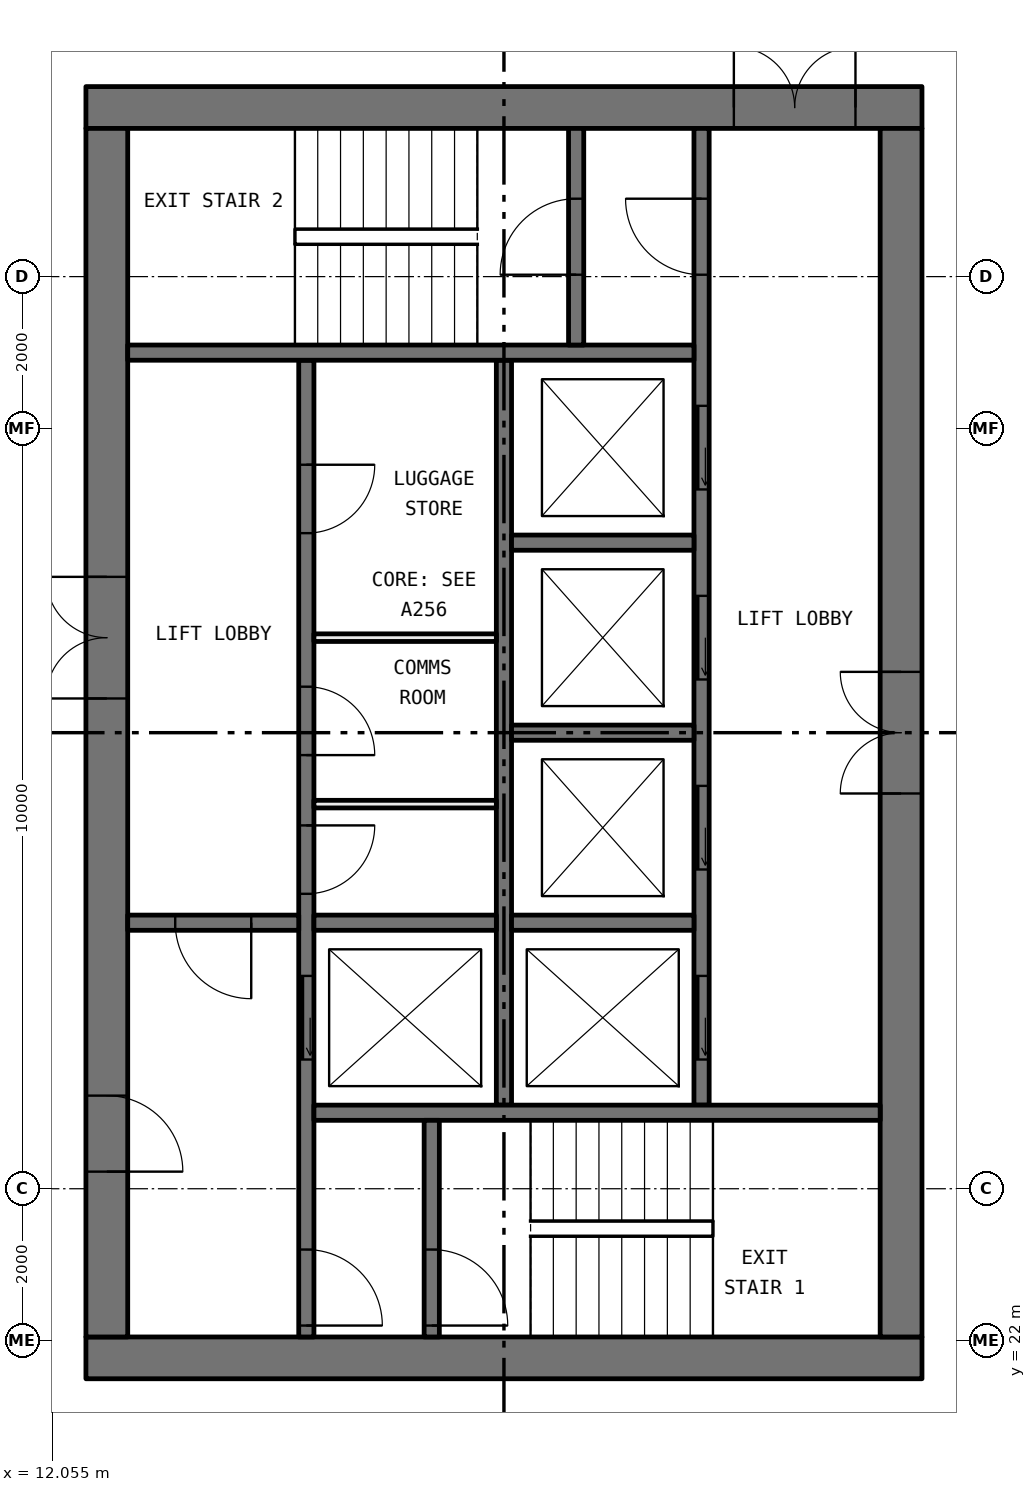
"""IFC4 building model, lengths in metres.
Left out: names, types, materials, properties, quantities, classifications, styles, units other than length and angle.
Written with IfcOpenShell. Run it as: python <this file> out.ifc"""

import sys

from ifc_helpers import new_model, si_unit, direction, frame, frame_2d, origin, place, context, subcontext, project, spatial, rectangle, extrude, element, fill, save


model = new_model("IFC4")
c1 = context("Model", 3, precision=1e-05, world=origin(), true_north=direction((0.0, 1.0)))
c2 = subcontext(c1, "Body", "Model", "MODEL_VIEW")
j1 = project(units=[si_unit("LENGTHUNIT", "METRE"), si_unit("PLANEANGLEUNIT", "RADIAN")], contexts=[c1])
p1 = place(None, origin())
s1 = spatial("IfcSite", under=j1, at=p1, CompositionType="ELEMENT")
p2 = place(p1, origin())
s2 = spatial("IfcBuilding", under=s1, at=p2, CompositionType="ELEMENT")
p3 = place(p2, frame((0.0, 0.0, 206.55)))
s3 = spatial("IfcBuildingStorey", under=s2, at=p3, CompositionType="ELEMENT", Elevation=206.55)
p4 = place(p3, frame((12.5, 21.775, 0.0), z_axis=(0.0, 0.0, 1.0), x_axis=(1.0, 0.0, 0.0)))
e1 = element("IfcWall", 1, at=p4, inside=s3, PredefinedType="SHEAR", context=c2, shape_type="SweptSolid", body=[
    extrude(rectangle(XDim=11.0, YDim=0.55, at=frame_2d((5.5, 0.0))), origin(), (0.0, 0.0, 1.0), 3.05),
])
p5 = place(p3, frame((12.5, 38.225, 0.0), z_axis=(0.0, 0.0, 1.0), x_axis=(1.0, 0.0, 0.0)))
e2 = element("IfcWall", 2, at=p5, inside=s3, PredefinedType="SHEAR", context=c2, shape_type="SweptSolid", body=[
    extrude(rectangle(XDim=11.0, YDim=0.55, at=frame_2d((5.5, 0.0))), origin(), (0.0, 0.0, 1.0), 3.05),
])
p6 = place(p5, frame((8.525, 0.0, 0.0)))
e3 = element("IfcOpeningElement", 3, at=p6, cuts=e2, PredefinedType="OPENING", context=c2, shape_type="SweptSolid", body=[
    extrude(rectangle(XDim=1.6, YDim=2.1, at=frame_2d((0.8, 1.05))), frame((0.0, 0.285, 0.0), z_axis=(0.0, -1.0, 0.0), x_axis=(1.0, 0.0, 0.0)), (0.0, 0.0, 1.0), 0.57),
])
p7 = place(p3, frame((12.775, 22.05, 0.0), z_axis=(0.0, 0.0, 1.0), x_axis=(0.0, 1.0, 0.0)))
e4 = element("IfcWall", 4, at=p7, inside=s3, PredefinedType="SHEAR", context=c2, shape_type="SweptSolid", body=[
    extrude(rectangle(XDim=15.9, YDim=0.55, at=frame_2d((7.95, 0.0))), origin(), (0.0, 0.0, 1.0), 3.05),
])
p8 = place(p7, frame((8.4, 0.0, 0.0)))
e5 = element("IfcOpeningElement", 5, at=p8, cuts=e4, PredefinedType="OPENING", context=c2, shape_type="SweptSolid", body=[
    extrude(rectangle(XDim=1.6, YDim=2.1, at=frame_2d((0.8, 1.05))), frame((0.0, 0.285, 0.0), z_axis=(0.0, -1.0, 0.0), x_axis=(1.0, 0.0, 0.0)), (0.0, 0.0, 1.0), 0.57),
])
p9 = place(p7, frame((2.175, 0.0, 0.0)))
e6 = element("IfcOpeningElement", 6, at=p9, cuts=e4, PredefinedType="OPENING", context=c2, shape_type="SweptSolid", body=[
    extrude(rectangle(XDim=1.0, YDim=2.1, at=frame_2d((0.5, 1.05))), frame((0.0, 0.285, 0.0), z_axis=(0.0, -1.0, 0.0), x_axis=(1.0, 0.0, 0.0)), (0.0, 0.0, 1.0), 0.57),
])
p10 = place(p3, frame((23.225, 22.05, 0.0), z_axis=(0.0, 0.0, 1.0), x_axis=(0.0, 1.0, 0.0)))
e7 = element("IfcWall", 7, at=p10, inside=s3, PredefinedType="SHEAR", context=c2, shape_type="SweptSolid", body=[
    extrude(rectangle(XDim=15.9, YDim=0.55, at=frame_2d((7.95, 0.0))), origin(), (0.0, 0.0, 1.0), 3.05),
])
p11 = place(p10, frame((7.15, 0.0, 0.0)))
e8 = element("IfcOpeningElement", 8, at=p11, cuts=e7, PredefinedType="OPENING", context=c2, shape_type="SweptSolid", body=[
    extrude(rectangle(XDim=1.6, YDim=2.1, at=frame_2d((0.8, 1.05))), frame((0.0, 0.285, 0.0), z_axis=(0.0, -1.0, 0.0), x_axis=(1.0, 0.0, 0.0)), (0.0, 0.0, 1.0), 0.57),
])
p12 = place(p3, frame((15.4, 22.05, 0.0), z_axis=(0.0, 0.0, 1.0), x_axis=(0.0, 1.0, 0.0)))
e9 = element("IfcWall", 9, at=p12, inside=s3, PredefinedType="SOLIDWALL", context=c2, shape_type="SweptSolid", body=[
    extrude(rectangle(XDim=12.85, YDim=0.2, at=frame_2d((6.425, 0.0))), origin(), (0.0, 0.0, 1.0), 3.05),
])
p13 = place(p12, frame((3.65, 0.0, 0.0)))
e10 = element("IfcOpeningElement", 10, at=p13, cuts=e9, PredefinedType="OPENING", context=c2, shape_type="SweptSolid", body=[
    extrude(rectangle(XDim=1.1, YDim=2.1, at=frame_2d((0.55, 1.05))), frame((0.0, 0.11, 0.0), z_axis=(0.0, -1.0, 0.0), x_axis=(1.0, 0.0, 0.0)), (0.0, 0.0, 1.0), 0.22),
])
p14 = place(p12, frame((0.15, 0.0, 0.0)))
e11 = element("IfcOpeningElement", 11, at=p14, cuts=e9, PredefinedType="OPENING", context=c2, shape_type="SweptSolid", body=[
    extrude(rectangle(XDim=1.0, YDim=2.1, at=frame_2d((0.5, 1.05))), frame((0.0, 0.11, 0.0), z_axis=(0.0, -1.0, 0.0), x_axis=(1.0, 0.0, 0.0)), (0.0, 0.0, 1.0), 0.22),
])
p15 = place(p12, frame((5.83, 0.0, 0.0)))
e12 = element("IfcOpeningElement", 12, at=p15, cuts=e9, PredefinedType="OPENING", context=c2, shape_type="SweptSolid", body=[
    extrude(rectangle(XDim=0.9, YDim=2.1, at=frame_2d((0.45, 1.05))), frame((0.0, 0.11, 0.0), z_axis=(0.0, -1.0, 0.0), x_axis=(1.0, 0.0, 0.0)), (0.0, 0.0, 1.0), 0.22),
])
p16 = place(p12, frame((7.655, 0.0, 0.0)))
e13 = element("IfcOpeningElement", 13, at=p16, cuts=e9, PredefinedType="OPENING", context=c2, shape_type="SweptSolid", body=[
    extrude(rectangle(XDim=0.9, YDim=2.1, at=frame_2d((0.45, 1.05))), frame((0.0, 0.11, 0.0), z_axis=(0.0, -1.0, 0.0), x_axis=(1.0, 0.0, 0.0)), (0.0, 0.0, 1.0), 0.22),
])
p17 = place(p12, frame((10.575, 0.0, 0.0)))
e14 = element("IfcOpeningElement", 14, at=p17, cuts=e9, PredefinedType="OPENING", context=c2, shape_type="SweptSolid", body=[
    extrude(rectangle(XDim=0.9, YDim=2.1, at=frame_2d((0.45, 1.05))), frame((0.0, 0.11, 0.0), z_axis=(0.0, -1.0, 0.0), x_axis=(1.0, 0.0, 0.0)), (0.0, 0.0, 1.0), 0.22),
])
p18 = place(p3, frame((20.6, 25.1, 0.0), z_axis=(0.0, 0.0, 1.0), x_axis=(0.0, 1.0, 0.0)))
e15 = element("IfcWall", 15, at=p18, inside=s3, PredefinedType="SOLIDWALL", context=c2, shape_type="SweptSolid", body=[
    extrude(rectangle(XDim=12.85, YDim=0.2, at=frame_2d((6.425, 0.0))), origin(), (0.0, 0.0, 1.0), 3.05),
])
p19 = place(p18, frame((0.6, 0.0, 0.0)))
e16 = element("IfcOpeningElement", 16, at=p19, cuts=e15, PredefinedType="OPENING", context=c2, shape_type="SweptSolid", body=[
    extrude(rectangle(XDim=1.1, YDim=2.1, at=frame_2d((0.55, 1.05))), frame((0.0, 0.11, 0.0), z_axis=(0.0, -1.0, 0.0), x_axis=(1.0, 0.0, 0.0)), (0.0, 0.0, 1.0), 0.22),
])
p20 = place(p18, frame((3.1, 0.0, 0.0)))
e17 = element("IfcOpeningElement", 17, at=p20, cuts=e15, PredefinedType="OPENING", context=c2, shape_type="SweptSolid", body=[
    extrude(rectangle(XDim=1.1, YDim=2.1, at=frame_2d((0.55, 1.05))), frame((0.0, 0.11, 0.0), z_axis=(0.0, -1.0, 0.0), x_axis=(1.0, 0.0, 0.0)), (0.0, 0.0, 1.0), 0.22),
])
p21 = place(p18, frame((5.6, 0.0, 0.0)))
e18 = element("IfcOpeningElement", 18, at=p21, cuts=e15, PredefinedType="OPENING", context=c2, shape_type="SweptSolid", body=[
    extrude(rectangle(XDim=1.1, YDim=2.1, at=frame_2d((0.55, 1.05))), frame((0.0, 0.11, 0.0), z_axis=(0.0, -1.0, 0.0), x_axis=(1.0, 0.0, 0.0)), (0.0, 0.0, 1.0), 0.22),
])
p22 = place(p18, frame((8.1, 0.0, 0.0)))
e19 = element("IfcOpeningElement", 19, at=p22, cuts=e15, PredefinedType="OPENING", context=c2, shape_type="SweptSolid", body=[
    extrude(rectangle(XDim=1.1, YDim=2.1, at=frame_2d((0.55, 1.05))), frame((0.0, 0.11, 0.0), z_axis=(0.0, -1.0, 0.0), x_axis=(1.0, 0.0, 0.0)), (0.0, 0.0, 1.0), 0.22),
])
p23 = place(p18, frame((10.925, 0.0, 0.0)))
e20 = element("IfcOpeningElement", 20, at=p23, cuts=e15, PredefinedType="OPENING", context=c2, shape_type="SweptSolid", body=[
    extrude(rectangle(XDim=1.0, YDim=2.1, at=frame_2d((0.5, 1.05))), frame((0.0, 0.11, 0.0), z_axis=(0.0, -1.0, 0.0), x_axis=(1.0, 0.0, 0.0)), (0.0, 0.0, 1.0), 0.22),
])
p24 = place(p3, frame((18.0, 25.1, 0.0), z_axis=(0.0, 0.0, 1.0), x_axis=(0.0, 1.0, 0.0)))
e21 = element("IfcWall", 21, at=p24, inside=s3, PredefinedType="SOLIDWALL", context=c2, shape_type="SweptSolid", body=[
    extrude(rectangle(XDim=9.8, YDim=0.2, at=frame_2d((4.9, 0.0))), origin(), (0.0, 0.0, 1.0), 3.05),
])
for number, where, z_axis, x_axis in (
    (22, (15.5, 25.0, 0.0), (0.0, 0.0, 1.0), (1.0, 0.0, 0.0)),
    (23, (13.05, 35.0, 0.0), (0.0, 0.0, 1.0), (1.0, 0.0, 0.0)),
):
    element("IfcWall", number, at=place(p3, frame(where, z_axis=z_axis, x_axis=x_axis)), inside=s3, PredefinedType="SOLIDWALL", context=c2, shape_type="SweptSolid", body=[
        extrude(rectangle(XDim=7.45, YDim=0.2, at=frame_2d((3.725, 0.0))), origin(), (0.0, 0.0, 1.0), 3.05),
    ])
p25 = place(p3, frame((13.05, 27.5, 0.0), z_axis=(0.0, 0.0, 1.0), x_axis=(1.0, 0.0, 0.0)))
e24 = element("IfcWall", 24, at=p25, inside=s3, PredefinedType="SOLIDWALL", context=c2, shape_type="SweptSolid", body=[
    extrude(rectangle(XDim=2.25, YDim=0.2, at=frame_2d((1.125, 0.0))), origin(), (0.0, 0.0, 1.0), 3.05),
])
p26 = place(p25, frame((0.625, 0.0, 0.0)))
e25 = element("IfcOpeningElement", 25, at=p26, cuts=e24, PredefinedType="OPENING", context=c2, shape_type="SweptSolid", body=[
    extrude(rectangle(XDim=1.0, YDim=2.1, at=frame_2d((0.5, 1.05))), frame((0.0, 0.11, 0.0), z_axis=(0.0, -1.0, 0.0), x_axis=(1.0, 0.0, 0.0)), (0.0, 0.0, 1.0), 0.22),
])
p27 = place(p3, frame((17.05, 22.05, 0.0), z_axis=(0.0, 0.0, 1.0), x_axis=(0.0, 1.0, 0.0)))
e26 = element("IfcWall", 26, at=p27, inside=s3, PredefinedType="SOLIDWALL", context=c2, shape_type="SweptSolid", body=[
    extrude(rectangle(XDim=2.85, YDim=0.2, at=frame_2d((1.425, 0.0))), origin(), (0.0, 0.0, 1.0), 3.05),
])
p28 = place(p27, frame((0.15, 0.0, 0.0)))
e27 = element("IfcOpeningElement", 27, at=p28, cuts=e26, PredefinedType="OPENING", context=c2, shape_type="SweptSolid", body=[
    extrude(rectangle(XDim=1.0, YDim=2.1, at=frame_2d((0.5, 1.05))), frame((0.0, 0.11, 0.0), z_axis=(0.0, -1.0, 0.0), x_axis=(1.0, 0.0, 0.0)), (0.0, 0.0, 1.0), 0.22),
])
p29 = place(p3, frame((18.95, 35.1, 0.0), z_axis=(0.0, 0.0, 1.0), x_axis=(0.0, 1.0, 0.0)))
e28 = element("IfcWall", 28, at=p29, inside=s3, PredefinedType="SOLIDWALL", context=c2, shape_type="SweptSolid", body=[
    extrude(rectangle(XDim=2.85, YDim=0.2, at=frame_2d((1.425, 0.0))), origin(), (0.0, 0.0, 1.0), 3.05),
])
p30 = place(p29, frame((0.925, 0.0, 0.0)))
e29 = element("IfcOpeningElement", 29, at=p30, cuts=e28, PredefinedType="OPENING", context=c2, shape_type="SweptSolid", body=[
    extrude(rectangle(XDim=1.0, YDim=2.1, at=frame_2d((0.5, 1.05))), frame((0.0, 0.11, 0.0), z_axis=(0.0, -1.0, 0.0), x_axis=(1.0, 0.0, 0.0)), (0.0, 0.0, 1.0), 0.22),
])
for number, where, z_axis, x_axis in (
    (30, (15.5, 27.5, 0.0), (0.0, 0.0, 1.0), (1.0, 0.0, 0.0)),
    (31, (18.1, 27.5, 0.0), (0.0, 0.0, 1.0), (1.0, 0.0, 0.0)),
    (32, (18.1, 30.0, 0.0), (0.0, 0.0, 1.0), (1.0, 0.0, 0.0)),
    (33, (18.1, 32.5, 0.0), (0.0, 0.0, 1.0), (1.0, 0.0, 0.0)),
):
    element("IfcWall", number, at=place(p3, frame(where, z_axis=z_axis, x_axis=x_axis)), inside=s3, PredefinedType="SOLIDWALL", context=c2, shape_type="SweptSolid", body=[
        extrude(rectangle(XDim=2.4, YDim=0.2, at=frame_2d((1.2, 0.0))), origin(), (0.0, 0.0, 1.0), 3.05),
    ])
for number, where, z_axis, x_axis in (
    (34, (15.5, 29.06, 0.0), (0.0, 0.0, 1.0), (1.0, 0.0, 0.0)),
    (35, (15.5, 31.25, 0.0), (0.0, 0.0, 1.0), (1.0, 0.0, 0.0)),
):
    element("IfcWall", number, at=place(p3, frame(where, z_axis=z_axis, x_axis=x_axis)), inside=s3, PredefinedType="PARTITIONING", context=c2, shape_type="SweptSolid", body=[
        extrude(rectangle(XDim=2.4, YDim=0.1, at=frame_2d((1.2, 0.0))), origin(), (0.0, 0.0, 1.0), 3.05),
    ])
p31 = place(p19, origin())
e36 = element("IfcDoor", 36, at=p31, inside=s3, OperationType="SLIDING_TO_LEFT", PredefinedType="DOOR", context=c2, shape_type="SweptSolid", body=[
    extrude(rectangle(XDim=1.1, YDim=2.1, at=frame_2d((0.55, 1.05))), frame((0.0, 0.025, 0.0), z_axis=(0.0, -1.0, 0.0), x_axis=(1.0, 0.0, 0.0)), (0.0, 0.0, 1.0), 0.05),
])
fill(e16, e36)
p32 = place(p20, origin())
e37 = element("IfcDoor", 37, at=p32, inside=s3, OperationType="SLIDING_TO_LEFT", PredefinedType="DOOR", context=c2, shape_type="SweptSolid", body=[
    extrude(rectangle(XDim=1.1, YDim=2.1, at=frame_2d((0.55, 1.05))), frame((0.0, 0.025, 0.0), z_axis=(0.0, -1.0, 0.0), x_axis=(1.0, 0.0, 0.0)), (0.0, 0.0, 1.0), 0.05),
])
fill(e17, e37)
p33 = place(p21, origin())
e38 = element("IfcDoor", 38, at=p33, inside=s3, OperationType="SLIDING_TO_LEFT", PredefinedType="DOOR", context=c2, shape_type="SweptSolid", body=[
    extrude(rectangle(XDim=1.1, YDim=2.1, at=frame_2d((0.55, 1.05))), frame((0.0, 0.025, 0.0), z_axis=(0.0, -1.0, 0.0), x_axis=(1.0, 0.0, 0.0)), (0.0, 0.0, 1.0), 0.05),
])
fill(e18, e38)
p34 = place(p22, origin())
e39 = element("IfcDoor", 39, at=p34, inside=s3, OperationType="SLIDING_TO_LEFT", PredefinedType="DOOR", context=c2, shape_type="SweptSolid", body=[
    extrude(rectangle(XDim=1.1, YDim=2.1, at=frame_2d((0.55, 1.05))), frame((0.0, 0.025, 0.0), z_axis=(0.0, -1.0, 0.0), x_axis=(1.0, 0.0, 0.0)), (0.0, 0.0, 1.0), 0.05),
])
fill(e19, e39)
p35 = place(p13, origin())
e40 = element("IfcDoor", 40, at=p35, inside=s3, OperationType="SLIDING_TO_LEFT", PredefinedType="DOOR", context=c2, shape_type="SweptSolid", body=[
    extrude(rectangle(XDim=1.1, YDim=2.1, at=frame_2d((0.55, 1.05))), frame((0.0, 0.025, 0.0), z_axis=(0.0, -1.0, 0.0), x_axis=(1.0, 0.0, 0.0)), (0.0, 0.0, 1.0), 0.05),
])
fill(e10, e40)
p36 = place(p28, frame((1.0, 0.0, 0.0), x_axis=(-1.0, 0.0, 0.0)))
e41 = element("IfcDoor", 41, at=p36, inside=s3, OperationType="SINGLE_SWING_LEFT", PredefinedType="DOOR", context=c2, shape_type="SweptSolid", body=[
    extrude(rectangle(XDim=1.0, YDim=2.1, at=frame_2d((0.5, 1.05))), frame((0.0, 0.025, 0.0), z_axis=(0.0, -1.0, 0.0), x_axis=(1.0, 0.0, 0.0)), (0.0, 0.0, 1.0), 0.05),
])
fill(e27, e41)
p37 = place(p14, frame((1.0, 0.0, 0.0), x_axis=(-1.0, 0.0, 0.0)))
e42 = element("IfcDoor", 42, at=p37, inside=s3, OperationType="SINGLE_SWING_LEFT", PredefinedType="DOOR", context=c2, shape_type="SweptSolid", body=[
    extrude(rectangle(XDim=1.0, YDim=2.1, at=frame_2d((0.5, 1.05))), frame((0.0, 0.025, 0.0), z_axis=(0.0, -1.0, 0.0), x_axis=(1.0, 0.0, 0.0)), (0.0, 0.0, 1.0), 0.05),
])
fill(e11, e42)
p38 = place(p23, origin())
e43 = element("IfcDoor", 43, at=p38, inside=s3, OperationType="SINGLE_SWING_LEFT", PredefinedType="DOOR", context=c2, shape_type="SweptSolid", body=[
    extrude(rectangle(XDim=1.0, YDim=2.1, at=frame_2d((0.5, 1.05))), frame((0.0, 0.025, 0.0), z_axis=(0.0, -1.0, 0.0), x_axis=(1.0, 0.0, 0.0)), (0.0, 0.0, 1.0), 0.05),
])
fill(e20, e43)
p39 = place(p30, origin())
e44 = element("IfcDoor", 44, at=p39, inside=s3, OperationType="SINGLE_SWING_RIGHT", PredefinedType="DOOR", context=c2, shape_type="SweptSolid", body=[
    extrude(rectangle(XDim=1.0, YDim=2.1, at=frame_2d((0.5, 1.05))), frame((0.0, 0.025, 0.0), z_axis=(0.0, -1.0, 0.0), x_axis=(1.0, 0.0, 0.0)), (0.0, 0.0, 1.0), 0.05),
])
fill(e29, e44)
p40 = place(p26, frame((1.0, 0.0, 0.0), x_axis=(-1.0, 0.0, 0.0)))
e45 = element("IfcDoor", 45, at=p40, inside=s3, OperationType="SINGLE_SWING_RIGHT", PredefinedType="DOOR", context=c2, shape_type="SweptSolid", body=[
    extrude(rectangle(XDim=1.0, YDim=2.1, at=frame_2d((0.5, 1.05))), frame((0.0, 0.025, 0.0), z_axis=(0.0, -1.0, 0.0), x_axis=(1.0, 0.0, 0.0)), (0.0, 0.0, 1.0), 0.05),
])
fill(e25, e45)
p41 = place(p8, origin())
e46 = element("IfcDoor", 46, at=p41, inside=s3, OperationType="DOUBLE_DOOR_SINGLE_SWING", PredefinedType="DOOR", context=c2, shape_type="SweptSolid", body=[
    extrude(rectangle(XDim=1.6, YDim=2.1, at=frame_2d((0.8, 1.05))), frame((0.0, 0.025, 0.0), z_axis=(0.0, -1.0, 0.0), x_axis=(1.0, 0.0, 0.0)), (0.0, 0.0, 1.0), 0.05),
])
fill(e5, e46)
p42 = place(p9, frame((1.0, 0.0, 0.0), x_axis=(-1.0, 0.0, 0.0)))
e47 = element("IfcDoor", 47, at=p42, inside=s3, OperationType="SINGLE_SWING_LEFT", PredefinedType="DOOR", context=c2, shape_type="SweptSolid", body=[
    extrude(rectangle(XDim=1.0, YDim=2.1, at=frame_2d((0.5, 1.05))), frame((0.0, 0.025, 0.0), z_axis=(0.0, -1.0, 0.0), x_axis=(1.0, 0.0, 0.0)), (0.0, 0.0, 1.0), 0.05),
])
fill(e6, e47)
p43 = place(p6, origin())
e48 = element("IfcDoor", 48, at=p43, inside=s3, OperationType="DOUBLE_DOOR_SINGLE_SWING", PredefinedType="DOOR", context=c2, shape_type="SweptSolid", body=[
    extrude(rectangle(XDim=1.6, YDim=2.1, at=frame_2d((0.8, 1.05))), frame((0.0, 0.025, 0.0), z_axis=(0.0, -1.0, 0.0), x_axis=(1.0, 0.0, 0.0)), (0.0, 0.0, 1.0), 0.05),
])
fill(e3, e48)
p44 = place(p11, origin())
e49 = element("IfcDoor", 49, at=p44, inside=s3, OperationType="DOUBLE_DOOR_SINGLE_SWING", PredefinedType="DOOR", context=c2, shape_type="SweptSolid", body=[
    extrude(rectangle(XDim=1.6, YDim=2.1, at=frame_2d((0.8, 1.05))), frame((0.0, 0.025, 0.0), z_axis=(0.0, -1.0, 0.0), x_axis=(1.0, 0.0, 0.0)), (0.0, 0.0, 1.0), 0.05),
])
fill(e8, e49)
p45 = place(p15, frame((0.9, 0.0, 0.0), x_axis=(-1.0, 0.0, 0.0)))
e50 = element("IfcDoor", 50, at=p45, inside=s3, OperationType="SINGLE_SWING_RIGHT", PredefinedType="DOOR", context=c2, shape_type="SweptSolid", body=[
    extrude(rectangle(XDim=0.9, YDim=2.1, at=frame_2d((0.45, 1.05))), frame((0.0, 0.025, 0.0), z_axis=(0.0, -1.0, 0.0), x_axis=(1.0, 0.0, 0.0)), (0.0, 0.0, 1.0), 0.05),
])
fill(e12, e50)
p46 = place(p16, frame((0.9, 0.0, 0.0), x_axis=(-1.0, 0.0, 0.0)))
e51 = element("IfcDoor", 51, at=p46, inside=s3, OperationType="SINGLE_SWING_LEFT", PredefinedType="DOOR", context=c2, shape_type="SweptSolid", body=[
    extrude(rectangle(XDim=0.9, YDim=2.1, at=frame_2d((0.45, 1.05))), frame((0.0, 0.025, 0.0), z_axis=(0.0, -1.0, 0.0), x_axis=(1.0, 0.0, 0.0)), (0.0, 0.0, 1.0), 0.05),
])
fill(e13, e51)
p47 = place(p17, frame((0.9, 0.0, 0.0), x_axis=(-1.0, 0.0, 0.0)))
e52 = element("IfcDoor", 52, at=p47, inside=s3, OperationType="SINGLE_SWING_RIGHT", PredefinedType="DOOR", context=c2, shape_type="SweptSolid", body=[
    extrude(rectangle(XDim=0.9, YDim=2.1, at=frame_2d((0.45, 1.05))), frame((0.0, 0.025, 0.0), z_axis=(0.0, -1.0, 0.0), x_axis=(1.0, 0.0, 0.0)), (0.0, 0.0, 1.0), 0.05),
])
fill(e14, e52)
save(model, sys.argv[1])
